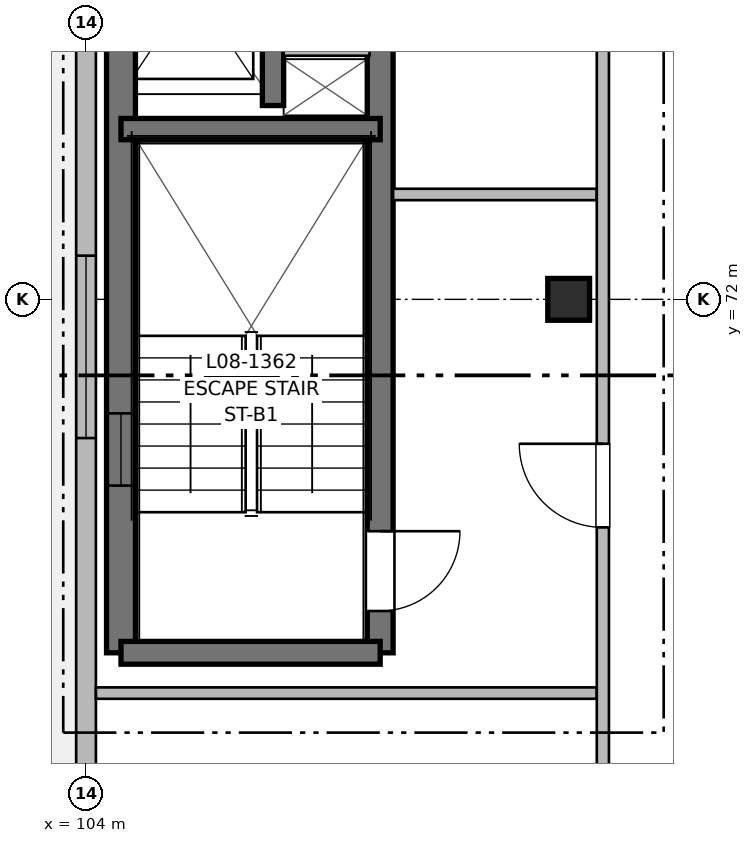
"""IFC4 building model, lengths in metres.
Left out: names, types, materials, properties, quantities, classifications, styles, units other than length and angle.
Written with IfcOpenShell. Run it as: python <this file> out.ifc"""

import sys

from ifc_helpers import new_model, si_unit, direction, frame, frame_2d, origin, origin_2d, place, context, subcontext, project, spatial, rectangle, extrude, element, fill, save


model = new_model("IFC4")
c1 = context("Model", 3, precision=1e-05, world=origin(), true_north=direction((0.0, 1.0)))
c2 = subcontext(c1, "Body", "Model", "MODEL_VIEW")
j1 = project(units=[si_unit("LENGTHUNIT", "METRE"), si_unit("PLANEANGLEUNIT", "RADIAN")], contexts=[c1])
p1 = place(None, origin())
s1 = spatial("IfcSite", under=j1, at=p1, CompositionType="ELEMENT")
p2 = place(p1, origin())
s2 = spatial("IfcBuilding", under=s1, at=p2, CompositionType="ELEMENT")
p3 = place(p2, frame((0.0, 0.0, 26.56)))
s3 = spatial("IfcBuildingStorey", under=s2, at=p3, CompositionType="ELEMENT", Elevation=26.56)
p4 = place(p3, frame((110.35, 72.0, 0.0), z_axis=(0.0, 0.0, 1.0), x_axis=(1.0, 0.0, 0.0)))
e1 = element("IfcColumn", 1, at=p4, inside=s3, PredefinedType="COLUMN", context=c2, shape_type="SweptSolid", body=[
    extrude(rectangle(XDim=0.55, YDim=0.55, at=origin_2d()), origin(), (0.0, 0.0, 1.0), 3.2),
])
p5 = place(p3, frame((104.46, 67.35, 0.0), z_axis=(0.0, 0.0, 1.0), x_axis=(0.0, 1.0, 0.0)))
e2 = element("IfcWall", 2, at=p5, inside=s3, PredefinedType="SHEAR", context=c2, shape_type="SweptSolid", body=[
    extrude(rectangle(XDim=12.45, YDim=0.38, at=frame_2d((6.225, 0.0))), origin(), (0.0, 0.0, 1.0), 3.2),
])
p6 = place(p5, frame((2.2, 0.0, 0.97)))
e3 = element("IfcOpeningElement", 3, at=p6, cuts=e2, PredefinedType="OPENING", context=c2, shape_type="SweptSolid", body=[
    extrude(rectangle(XDim=0.95, YDim=1.25, at=frame_2d((0.475, 0.625))), frame((0.0, 0.2, 0.0), z_axis=(0.0, -1.0, 0.0), x_axis=(1.0, 0.0, 0.0)), (0.0, 0.0, 1.0), 0.4),
])
p7 = place(p3, frame((107.87, 79.8, 0.0), z_axis=(0.0, 0.0, 1.0), x_axis=(0.0, -1.0, 0.0)))
e4 = element("IfcWall", 4, at=p7, inside=s3, PredefinedType="SHEAR", context=c2, shape_type="SweptSolid", body=[
    extrude(rectangle(XDim=12.45, YDim=0.34, at=frame_2d((6.225, 0.0))), origin(), (0.0, 0.0, 1.0), 3.2),
])
p8 = place(p7, frame((10.85, 0.0, 0.0)))
e5 = element("IfcOpeningElement", 5, at=p8, cuts=e4, PredefinedType="OPENING", context=c2, shape_type="SweptSolid", body=[
    extrude(rectangle(XDim=1.05, YDim=2.15, at=frame_2d((0.525, 1.075))), frame((0.0, 0.18, 0.0), z_axis=(0.0, -1.0, 0.0), x_axis=(1.0, 0.0, 0.0)), (0.0, 0.0, 1.0), 0.36),
])
p9 = place(p3, frame((107.87, 67.35, 0.0), z_axis=(0.0, 0.0, 1.0), x_axis=(-1.0, 0.0, 0.0)))
e6 = element("IfcWall", 6, at=p9, inside=s3, PredefinedType="SHEAR", context=c2, shape_type="SweptSolid", body=[
    extrude(rectangle(XDim=3.41, YDim=0.3, at=frame_2d((1.705, 0.0))), origin(), (0.0, 0.0, 1.0), 3.2),
])
p10 = place(p3, frame((104.46, 74.24, 0.0), z_axis=(0.0, 0.0, 1.0), x_axis=(1.0, 0.0, 0.0)))
e7 = element("IfcWall", 7, at=p10, inside=s3, PredefinedType="SHEAR", context=c2, shape_type="SweptSolid", body=[
    extrude(rectangle(XDim=3.41, YDim=0.28, at=frame_2d((1.705, 0.0))), origin(), (0.0, 0.0, 1.0), 3.2),
])
p11 = place(p3, frame((106.46, 74.55, 0.0), z_axis=(0.0, 0.0, 1.0), x_axis=(0.0, 1.0, 0.0)))
e8 = element("IfcWall", 8, at=p11, inside=s3, PredefinedType="SHEAR", context=c2, shape_type="SweptSolid", body=[
    extrude(rectangle(XDim=5.25, YDim=0.28, at=frame_2d((2.625, 0.0))), origin(), (0.0, 0.0, 1.0), 3.2),
])
p12 = place(p11, frame((1.15, 0.0, 0.0)))
e9 = element("IfcOpeningElement", 9, at=p12, cuts=e8, PredefinedType="OPENING", context=c2, shape_type="SweptSolid", body=[
    extrude(rectangle(XDim=1.0, YDim=2.15, at=frame_2d((0.5, 1.075))), frame((0.0, 0.15, 0.0), z_axis=(0.0, -1.0, 0.0), x_axis=(1.0, 0.0, 0.0)), (0.0, 0.0, 1.0), 0.3),
])
p13 = place(p11, frame((3.85, 0.0, 0.0)))
e10 = element("IfcOpeningElement", 10, at=p13, cuts=e8, PredefinedType="OPENING", context=c2, shape_type="SweptSolid", body=[
    extrude(rectangle(XDim=0.9, YDim=2.15, at=frame_2d((0.45, 1.075))), frame((0.0, 0.15, 0.0), z_axis=(0.0, -1.0, 0.0), x_axis=(1.0, 0.0, 0.0)), (0.0, 0.0, 1.0), 0.3),
])
p14 = place(p3, frame((106.6, 75.28, 0.0), z_axis=(0.0, 0.0, 1.0), x_axis=(1.0, 0.0, 0.0)))
e11 = element("IfcWall", 11, at=p14, inside=s3, PredefinedType="PARTITIONING", context=c2, shape_type="SweptSolid", body=[
    extrude(rectangle(XDim=1.13, YDim=0.15, at=frame_2d((0.565, 0.0))), origin(), (0.0, 0.0, 1.0), 2.95),
])
p15 = place(p3, frame((104.0, 59.0, 0.0), z_axis=(0.0, 0.0, 1.0), x_axis=(0.0, 1.0, 0.0)))
e12 = element("IfcWall", 12, at=p15, inside=s3, PredefinedType="SOLIDWALL", context=c2, shape_type="SweptSolid", body=[
    extrude(rectangle(XDim=33.0, YDim=0.26, at=frame_2d((16.5, 0.0))), origin(), (0.0, 0.0, 1.0), 2.98),
])
p16 = place(p15, frame((3.125, 0.0, 0.0)))
e13 = element("IfcOpeningElement", 13, at=p16, cuts=e12, PredefinedType="OPENING", context=c2, shape_type="SweptSolid", body=[
    extrude(rectangle(XDim=1.2, YDim=2.2, at=frame_2d((0.6, 1.1))), frame((0.0, 0.14, 0.0), z_axis=(0.0, -1.0, 0.0), x_axis=(1.0, 0.0, 0.0)), (0.0, 0.0, 1.0), 0.28),
])
p17 = place(p15, frame((5.425, 0.0, 0.62)))
e14 = element("IfcOpeningElement", 14, at=p17, cuts=e12, PredefinedType="OPENING", context=c2, shape_type="SweptSolid", body=[
    extrude(rectangle(XDim=1.1, YDim=1.6, at=frame_2d((0.55, 0.8))), frame((0.0, 0.14, 0.0), z_axis=(0.0, -1.0, 0.0), x_axis=(1.0, 0.0, 0.0)), (0.0, 0.0, 1.0), 0.28),
])
p18 = place(p15, frame((11.175, 0.0, 0.72)))
e15 = element("IfcOpeningElement", 15, at=p18, cuts=e12, PredefinedType="OPENING", context=c2, shape_type="SweptSolid", body=[
    extrude(rectangle(XDim=2.4, YDim=1.5, at=frame_2d((1.2, 0.75))), frame((0.0, 0.14, 0.0), z_axis=(0.0, -1.0, 0.0), x_axis=(1.0, 0.0, 0.0)), (0.0, 0.0, 1.0), 0.28),
])
p19 = place(p15, frame((19.025, 0.0, 0.82)))
e16 = element("IfcOpeningElement", 16, at=p19, cuts=e12, PredefinedType="OPENING", context=c2, shape_type="SweptSolid", body=[
    extrude(rectangle(XDim=1.5, YDim=1.4, at=frame_2d((0.75, 0.7))), frame((0.0, 0.14, 0.0), z_axis=(0.0, -1.0, 0.0), x_axis=(1.0, 0.0, 0.0)), (0.0, 0.0, 1.0), 0.28),
])
p20 = place(p15, frame((28.1, 0.0, 0.82)))
e17 = element("IfcOpeningElement", 17, at=p20, cuts=e12, PredefinedType="OPENING", context=c2, shape_type="SweptSolid", body=[
    extrude(rectangle(XDim=1.55, YDim=1.4, at=frame_2d((0.775, 0.7))), frame((0.0, 0.14, 0.0), z_axis=(0.0, -1.0, 0.0), x_axis=(1.0, 0.0, 0.0)), (0.0, 0.0, 1.0), 0.28),
])
p21 = place(p3, frame((104.13, 66.82, 0.0), z_axis=(0.0, 0.0, 1.0), x_axis=(1.0, 0.0, 0.0)))
e18 = element("IfcWall", 18, at=p21, inside=s3, PredefinedType="PARTITIONING", context=c2, shape_type="SweptSolid", body=[
    extrude(rectangle(XDim=6.59, YDim=0.15, at=frame_2d((3.295, 0.0))), origin(), (0.0, 0.0, 1.0), 2.935),
])
p22 = place(p3, frame((108.04, 73.38, 0.0), z_axis=(0.0, 0.0, 1.0), x_axis=(1.0, 0.0, 0.0)))
e19 = element("IfcWall", 19, at=p22, inside=s3, PredefinedType="PARTITIONING", context=c2, shape_type="SweptSolid", body=[
    extrude(rectangle(XDim=2.68, YDim=0.15, at=frame_2d((1.34, 0.0))), origin(), (0.0, 0.0, 1.0), 2.935),
])
p23 = place(p3, frame((110.8, 59.16, 0.0), z_axis=(0.0, 0.0, 1.0), x_axis=(0.0, 1.0, 0.0)))
e20 = element("IfcWall", 20, at=p23, inside=s3, PredefinedType="PARTITIONING", context=c2, shape_type="SweptSolid", body=[
    extrude(rectangle(XDim=47.64, YDim=0.16, at=frame_2d((23.82, 0.0))), origin(), (0.0, 0.0, 1.0), 2.935),
])
p24 = place(p23, frame((9.84, 0.0, 0.0)))
e21 = element("IfcOpeningElement", 21, at=p24, cuts=e20, PredefinedType="OPENING", context=c2, shape_type="SweptSolid", body=[
    extrude(rectangle(XDim=1.1, YDim=2.15, at=frame_2d((0.55, 1.075))), frame((0.0, 0.09, 0.0), z_axis=(0.0, -1.0, 0.0), x_axis=(1.0, 0.0, 0.0)), (0.0, 0.0, 1.0), 0.18),
])
p25 = place(p23, frame((16.24, 0.0, 0.0)))
e22 = element("IfcOpeningElement", 22, at=p25, cuts=e20, PredefinedType="OPENING", context=c2, shape_type="SweptSolid", body=[
    extrude(rectangle(XDim=1.6, YDim=2.15, at=frame_2d((0.8, 1.075))), frame((0.0, 0.09, 0.0), z_axis=(0.0, -1.0, 0.0), x_axis=(1.0, 0.0, 0.0)), (0.0, 0.0, 1.0), 0.18),
])
p26 = place(p23, frame((1.8, 0.0, 0.0)))
e23 = element("IfcOpeningElement", 23, at=p26, cuts=e20, PredefinedType="OPENING", context=c2, shape_type="SweptSolid", body=[
    extrude(rectangle(XDim=0.96, YDim=2.15, at=frame_2d((0.48, 1.075))), frame((0.0, 0.09, 0.0), z_axis=(0.0, -1.0, 0.0), x_axis=(1.0, 0.0, 0.0)), (0.0, 0.0, 1.0), 0.18),
])
p27 = place(p23, frame((29.645, 0.0, 0.0)))
e24 = element("IfcOpeningElement", 24, at=p27, cuts=e20, PredefinedType="OPENING", context=c2, shape_type="SweptSolid", body=[
    extrude(rectangle(XDim=0.98, YDim=2.15, at=frame_2d((0.49, 1.075))), frame((0.0, 0.09, 0.0), z_axis=(0.0, -1.0, 0.0), x_axis=(1.0, 0.0, 0.0)), (0.0, 0.0, 1.0), 0.18),
])
p28 = place(p23, frame((38.255, 0.0, 0.0)))
e25 = element("IfcOpeningElement", 25, at=p28, cuts=e20, PredefinedType="OPENING", context=c2, shape_type="SweptSolid", body=[
    extrude(rectangle(XDim=0.98, YDim=2.15, at=frame_2d((0.49, 1.075))), frame((0.0, 0.09, 0.0), z_axis=(0.0, -1.0, 0.0), x_axis=(1.0, 0.0, 0.0)), (0.0, 0.0, 1.0), 0.18),
])
p29 = place(p8, origin())
e26 = element("IfcDoor", 26, at=p29, inside=s3, OperationType="SINGLE_SWING_LEFT", PredefinedType="DOOR", context=c2, shape_type="SweptSolid", body=[
    extrude(rectangle(XDim=1.05, YDim=2.15, at=frame_2d((0.525, 1.075))), frame((0.0, 0.025, 0.0), z_axis=(0.0, -1.0, 0.0), x_axis=(1.0, 0.0, 0.0)), (0.0, 0.0, 1.0), 0.05),
])
fill(e5, e26)
p30 = place(p6, origin())
e27 = element("IfcWindow", 27, at=p30, inside=s3, PartitioningType="SINGLE_PANEL", PredefinedType="WINDOW", context=c2, shape_type="SweptSolid", body=[
    extrude(rectangle(XDim=0.95, YDim=1.25, at=frame_2d((0.475, 0.625))), frame((0.0, 0.03, 0.0), z_axis=(0.0, -1.0, 0.0), x_axis=(1.0, 0.0, 0.0)), (0.0, 0.0, 1.0), 0.06),
])
fill(e3, e27)
p31 = place(p18, origin())
e28 = element("IfcWindow", 28, at=p31, inside=s3, PartitioningType="SINGLE_PANEL", PredefinedType="WINDOW", context=c2, shape_type="SweptSolid", body=[
    extrude(rectangle(XDim=2.4, YDim=1.5, at=frame_2d((1.2, 0.75))), frame((0.0, 0.03, 0.0), z_axis=(0.0, -1.0, 0.0), x_axis=(1.0, 0.0, 0.0)), (0.0, 0.0, 1.0), 0.06),
])
fill(e15, e28)
p32 = place(p24, origin())
e29 = element("IfcDoor", 29, at=p32, inside=s3, OperationType="SINGLE_SWING_RIGHT", PredefinedType="DOOR", context=c2, shape_type="SweptSolid", body=[
    extrude(rectangle(XDim=1.1, YDim=2.15, at=frame_2d((0.55, 1.075))), frame((0.0, 0.025, 0.0), z_axis=(0.0, -1.0, 0.0), x_axis=(1.0, 0.0, 0.0)), (0.0, 0.0, 1.0), 0.05),
])
fill(e21, e29)
save(model, sys.argv[1])
